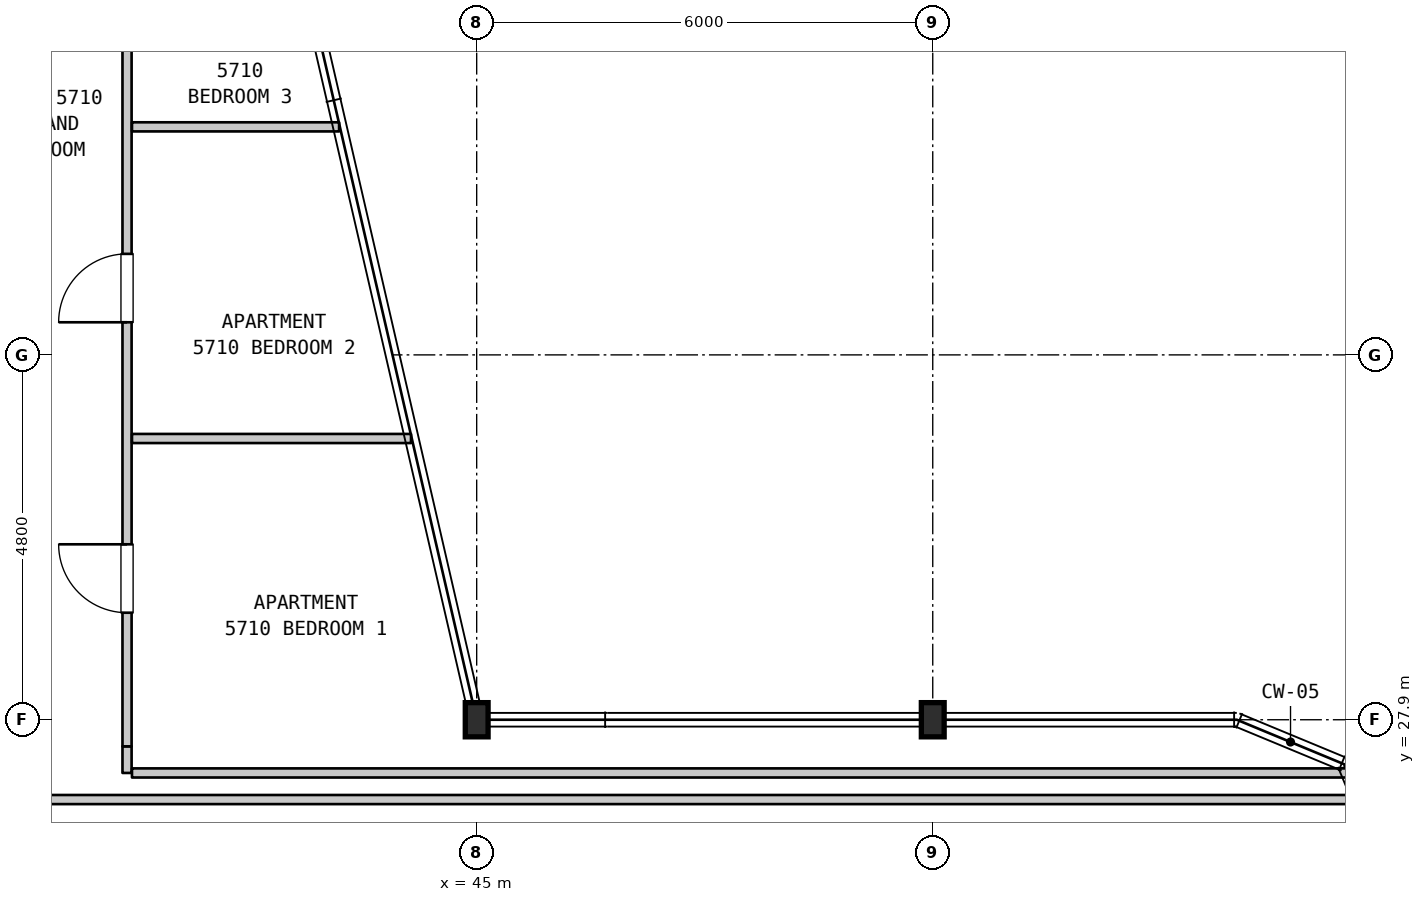
"""IFC4 building model, lengths in metres.
Left out: names, types, materials, properties, quantities, classifications, styles, units other than length and angle.
Written with IfcOpenShell. Run it as: python <this file> out.ifc"""

import sys

from ifc_helpers import new_model, si_unit, direction, frame, frame_2d, origin, origin_2d, place, context, subcontext, project, spatial, rectangle, i_section, extrude, element, fill, save


model = new_model("IFC4")
c1 = context("Model", 3, precision=1e-05, world=origin(), true_north=direction((0.0, 1.0)))
c2 = subcontext(c1, "Body", "Model", "MODEL_VIEW")
j1 = project(units=[si_unit("LENGTHUNIT", "METRE"), si_unit("PLANEANGLEUNIT", "RADIAN")], contexts=[c1])
p1 = place(None, origin())
s1 = spatial("IfcSite", under=j1, at=p1, CompositionType="ELEMENT")
p2 = place(p1, origin())
s2 = spatial("IfcBuilding", under=s1, at=p2, CompositionType="ELEMENT")
p3 = place(p2, frame((0.0, 0.0, 230.2)))
s3 = spatial("IfcBuildingStorey", under=s2, at=p3, CompositionType="ELEMENT", Elevation=230.2)
for number, where, z_axis, x_axis in (
    (1, (45.0, 27.9, 0.0), (0.0, 0.0, 1.0), (1.0, 0.0, 0.0)),
    (2, (51.0, 27.9, 0.0), (0.0, 0.0, 1.0), (1.0, 0.0, 0.0)),
):
    element("IfcColumn", number, at=place(p3, frame(where, z_axis=z_axis, x_axis=x_axis)), inside=s3, PredefinedType="COLUMN", context=c2, shape_type="SweptSolid", body=[
        extrude(i_section(OverallWidth=0.3, OverallDepth=0.45, WebThickness=0.014, FlangeThickness=0.026, FilletRadius=0.027, at=origin_2d()), origin(), (0.0, 0.0, 1.0), 3.7),
    ])
p4 = place(p3, frame((40.4, 27.2, 0.0), z_axis=(0.0, 0.0, 1.0), x_axis=(0.0, 1.0, 0.0)))
e3 = element("IfcWall", 3, at=p4, inside=s3, PredefinedType="PARTITIONING", context=c2, shape_type="SweptSolid", body=[
    extrude(rectangle(XDim=0.35, YDim=0.12, at=frame_2d((0.175, 0.0))), origin(), (0.0, 0.0, 1.0), 3.39),
])
p5 = place(p3, frame((40.4, 27.55, 0.0), z_axis=(0.0, 0.0, 1.0), x_axis=(0.0, 1.0, 0.0)))
e4 = element("IfcWall", 4, at=p5, inside=s3, PredefinedType="PARTITIONING", context=c2, shape_type="SweptSolid", body=[
    extrude(rectangle(XDim=12.2, YDim=0.12, at=frame_2d((6.1, 0.0))), origin(), (0.0, 0.0, 1.0), 3.39),
])
p6 = place(p5, frame((1.758, 0.0, 0.0)))
e5 = element("IfcOpeningElement", 5, at=p6, cuts=e4, PredefinedType="OPENING", context=c2, shape_type="SweptSolid", body=[
    extrude(rectangle(XDim=0.9, YDim=2.15, at=frame_2d((0.45, 1.075))), frame((0.0, 0.07, 0.0), z_axis=(0.0, -1.0, 0.0), x_axis=(1.0, 0.0, 0.0)), (0.0, 0.0, 1.0), 0.14),
])
p7 = place(p5, frame((5.579, 0.0, 0.0)))
e6 = element("IfcOpeningElement", 6, at=p7, cuts=e4, PredefinedType="OPENING", context=c2, shape_type="SweptSolid", body=[
    extrude(rectangle(XDim=0.9, YDim=2.15, at=frame_2d((0.45, 1.075))), frame((0.0, 0.07, 0.0), z_axis=(0.0, -1.0, 0.0), x_axis=(1.0, 0.0, 0.0)), (0.0, 0.0, 1.0), 0.14),
])
p8 = place(p5, frame((9.541, 0.0, 0.0)))
e7 = element("IfcOpeningElement", 7, at=p8, cuts=e4, PredefinedType="OPENING", context=c2, shape_type="SweptSolid", body=[
    extrude(rectangle(XDim=0.9, YDim=2.15, at=frame_2d((0.45, 1.075))), frame((0.0, 0.07, 0.0), z_axis=(0.0, -1.0, 0.0), x_axis=(1.0, 0.0, 0.0)), (0.0, 0.0, 1.0), 0.14),
])
p9 = place(p3, frame((36.645, 26.85, 0.0), z_axis=(0.0, 0.0, 1.0), x_axis=(1.0, 0.0, 0.0)))
e8 = element("IfcWall", 8, at=p9, inside=s3, PredefinedType="PARTITIONING", context=c2, shape_type="SweptSolid", body=[
    extrude(rectangle(XDim=19.951, YDim=0.12, at=frame_2d((9.976, 0.0))), origin(), (0.0, 0.0, 1.0), 3.39),
])
p10 = place(p3, frame((40.465, 27.2, 0.0), z_axis=(0.0, 0.0, 1.0), x_axis=(1.0, 0.0, 0.0)))
e9 = element("IfcWall", 9, at=p10, inside=s3, PredefinedType="PARTITIONING", context=c2, shape_type="SweptSolid", body=[
    extrude(rectangle(XDim=15.986, YDim=0.12, at=frame_2d((7.993, 0.0))), origin(), (0.0, 0.0, 1.0), 3.39),
])
p11 = place(p3, frame((40.465, 31.6, 0.0), z_axis=(0.0, 0.0, 1.0), x_axis=(1.0, 0.0, 0.0)))
e10 = element("IfcWall", 10, at=p11, inside=s3, PredefinedType="PARTITIONING", context=c2, shape_type="SweptSolid", body=[
    extrude(rectangle(XDim=3.671, YDim=0.12, at=frame_2d((1.835, 0.0))), origin(), (0.0, 0.0, 1.0), 3.39),
])
p12 = place(p3, frame((40.465, 35.7, 0.0), z_axis=(0.0, 0.0, 1.0), x_axis=(1.0, 0.0, 0.0)))
e11 = element("IfcWall", 11, at=p12, inside=s3, PredefinedType="PARTITIONING", context=c2, shape_type="SweptSolid", body=[
    extrude(rectangle(XDim=2.725, YDim=0.12, at=frame_2d((1.362, 0.0))), origin(), (0.0, 0.0, 1.0), 3.39),
])
p13 = place(p6, origin())
e12 = element("IfcDoor", 12, at=p13, inside=s3, OperationType="SINGLE_SWING_RIGHT", PredefinedType="DOOR", context=c2, shape_type="SweptSolid", body=[
    extrude(rectangle(XDim=0.9, YDim=2.15, at=frame_2d((0.45, 1.075))), frame((0.0, 0.025, 0.0), z_axis=(0.0, -1.0, 0.0), x_axis=(1.0, 0.0, 0.0)), (0.0, 0.0, 1.0), 0.05),
])
fill(e5, e12)
p14 = place(p7, origin())
e13 = element("IfcDoor", 13, at=p14, inside=s3, OperationType="SINGLE_SWING_LEFT", PredefinedType="DOOR", context=c2, shape_type="SweptSolid", body=[
    extrude(rectangle(XDim=0.9, YDim=2.15, at=frame_2d((0.45, 1.075))), frame((0.0, 0.025, 0.0), z_axis=(0.0, -1.0, 0.0), x_axis=(1.0, 0.0, 0.0)), (0.0, 0.0, 1.0), 0.05),
])
fill(e6, e13)
save(model, sys.argv[1])
